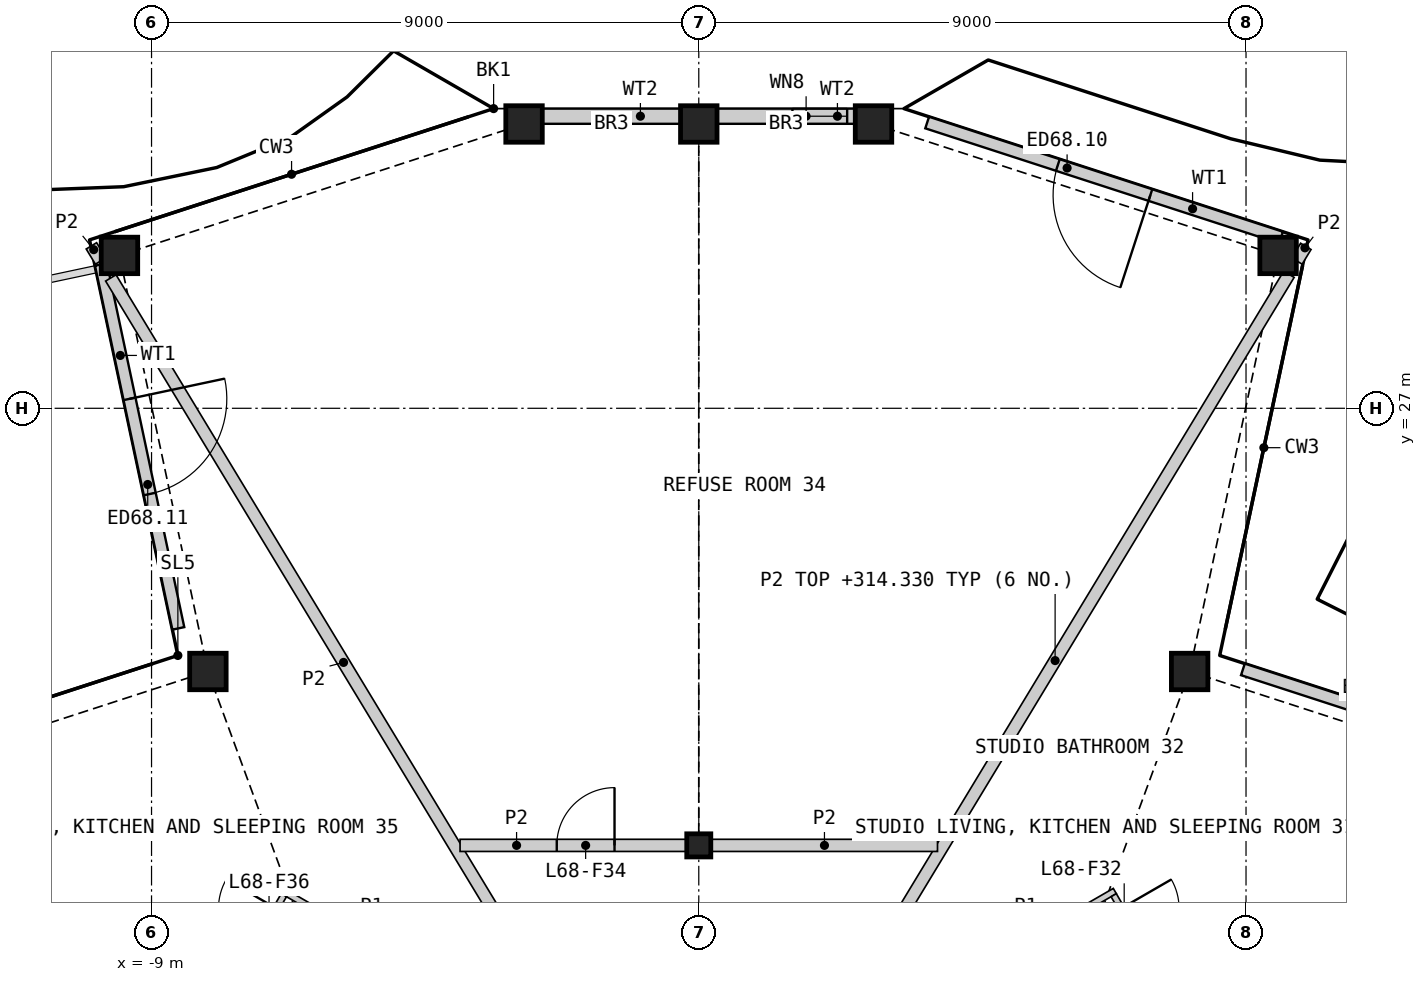
"""IFC4 building model, lengths in metres.
Left out: names, types, materials, properties, quantities, classifications, styles, units other than length and angle.
Written with IfcOpenShell. Run it as: python <this file> out.ifc"""

import sys

from ifc_helpers import new_model, si_unit, direction, frame, frame_2d, origin, origin_2d, place, context, subcontext, project, spatial, rectangle, hollow_rectangle, i_section, extrude, element, fill, save


model = new_model("IFC4")
c1 = context("Model", 3, precision=1e-05, world=origin(), true_north=direction((0.0, 1.0)))
c2 = subcontext(c1, "Body", "Model", "MODEL_VIEW")
j1 = project(units=[si_unit("LENGTHUNIT", "METRE"), si_unit("PLANEANGLEUNIT", "RADIAN")], contexts=[c1])
p1 = place(None, origin())
s1 = spatial("IfcSite", under=j1, at=p1, CompositionType="ELEMENT")
p2 = place(p1, origin())
s2 = spatial("IfcBuilding", under=s1, at=p2, CompositionType="ELEMENT")
p3 = place(p2, frame((0.0, 0.0, 312.0)))
s3 = spatial("IfcBuildingStorey", under=s2, at=p3, CompositionType="ELEMENT", Elevation=312.0)
for number, where, z_axis, x_axis in (
    (1, (8.073, 22.671, 0.0), (0.0, 0.0, 1.0), (1.0, 0.0, 0.0)),
    (2, (9.527, 29.514, 0.0), (0.0, 0.0, 1.0), (1.0, 0.0, 0.0)),
    (3, (2.874, 31.676, 0.0), (0.0, 0.0, 1.0), (1.0, 0.0, 0.0)),
    (4, (0.0, 31.676, 0.0), (0.0, 0.0, 1.0), (1.0, 0.0, 0.0)),
    (5, (-2.874, 31.676, 0.0), (0.0, 0.0, 1.0), (1.0, 0.0, 0.0)),
    (6, (-9.527, 29.514, 0.0), (0.0, 0.0, 1.0), (1.0, 0.0, 0.0)),
    (7, (-8.073, 22.671, 0.0), (0.0, 0.0, 1.0), (1.0, 0.0, 0.0)),
):
    element("IfcColumn", number, at=place(p3, frame(where, z_axis=z_axis, x_axis=x_axis)), inside=s3, PredefinedType="COLUMN", context=c2, shape_type="SweptSolid", body=[
        extrude(hollow_rectangle(XDim=0.6, YDim=0.6, WallThickness=0.04, at=origin_2d()), origin(), (0.0, 0.0, 1.0), 3.4),
    ])
p4 = place(p3, frame((0.0, 19.811, 0.0), z_axis=(0.0, 0.0, 1.0), x_axis=(1.0, 0.0, 0.0)))
e8 = element("IfcColumn", 8, at=p4, inside=s3, PredefinedType="COLUMN", context=c2, shape_type="SweptSolid", body=[
    extrude(i_section(OverallWidth=0.396, OverallDepth=0.381, WebThickness=0.019, FlangeThickness=0.03, at=origin_2d()), origin(), (0.0, 0.0, 1.0), 3.4),
])
p5 = place(p3, frame((14.769, 20.814, 0.0), z_axis=(0.0, 0.0, 1.0), x_axis=(-0.951069243123, 0.308977822483, 0.0)))
e9 = element("IfcWall", 9, at=p5, inside=s3, PredefinedType="SOLIDWALL", context=c2, shape_type="SweptSolid", body=[
    extrude(rectangle(XDim=6.12, YDim=0.2, at=frame_2d((3.06, 0.0))), origin(), (0.0, 0.0, 1.0), 2.488),
])
p6 = place(p5, frame((2.26, 0.0, 0.0)))
e10 = element("IfcOpeningElement", 10, at=p6, cuts=e9, PredefinedType="OPENING", context=c2, shape_type="SweptSolid", body=[
    extrude(rectangle(XDim=1.6, YDim=2.25, at=frame_2d((0.8, 1.125))), frame((0.0, 0.11, 0.0), z_axis=(0.0, -1.0, 0.0), x_axis=(1.0, 0.0, 0.0)), (0.0, 0.0, 1.0), 0.22),
])
p7 = place(p3, frame((9.576, 29.809, 0.0), z_axis=(0.0, 0.0, 1.0), x_axis=(-0.951053709789, 0.309025631781, 0.0)))
e11 = element("IfcWall", 11, at=p7, inside=s3, PredefinedType="SOLIDWALL", context=c2, shape_type="SweptSolid", body=[
    extrude(rectangle(XDim=6.12, YDim=0.2, at=frame_2d((3.06, 0.0))), origin(), (0.0, 0.0, 1.0), 2.488),
])
p8 = place(p7, frame((2.26, 0.0, 0.0)))
e12 = element("IfcOpeningElement", 12, at=p8, cuts=e11, PredefinedType="OPENING", context=c2, shape_type="SweptSolid", body=[
    extrude(rectangle(XDim=1.6, YDim=2.25, at=frame_2d((0.8, 1.125))), frame((0.0, 0.11, 0.0), z_axis=(0.0, -1.0, 0.0), x_axis=(1.0, 0.0, 0.0)), (0.0, 0.0, 1.0), 0.22),
])
p9 = place(p3, frame((2.94, 31.804, 0.0), z_axis=(0.0, 0.0, 1.0), x_axis=(-1.0, 0.0, 0.0)))
e13 = element("IfcWall", 13, at=p9, inside=s3, PredefinedType="SOLIDWALL", context=c2, shape_type="SweptSolid", body=[
    extrude(rectangle(XDim=2.64, YDim=0.25, at=frame_2d((1.32, 0.0))), origin(), (0.0, 0.0, 1.0), 2.488),
])
p10 = place(p9, frame((0.5, 0.0, 1.5)))
e14 = element("IfcOpeningElement", 14, at=p10, cuts=e13, PredefinedType="OPENING", context=c2, shape_type="SweptSolid", body=[
    extrude(rectangle(XDim=0.9, YDim=0.7, at=frame_2d((0.45, 0.35))), frame((0.0, 0.135, 0.0), z_axis=(0.0, -1.0, 0.0), x_axis=(1.0, 0.0, 0.0)), (0.0, 0.0, 1.0), 0.27),
])
p11 = place(p3, frame((-0.3, 31.804, 0.0), z_axis=(0.0, 0.0, 1.0), x_axis=(-1.0, 0.0, 0.0)))
e15 = element("IfcWall", 15, at=p11, inside=s3, PredefinedType="SOLIDWALL", context=c2, shape_type="SweptSolid", body=[
    extrude(rectangle(XDim=2.64, YDim=0.25, at=frame_2d((1.32, 0.0))), origin(), (0.0, 0.0, 1.0), 2.488),
])
p12 = place(p3, frame((-9.832, 29.366, 0.0), z_axis=(0.0, 0.0, 1.0), x_axis=(0.207932234858, -0.978143233738, 0.0)))
e16 = element("IfcWall", 16, at=p12, inside=s3, PredefinedType="SOLIDWALL", context=c2, shape_type="SweptSolid", body=[
    extrude(rectangle(XDim=6.12, YDim=0.2, at=frame_2d((3.06, 0.0))), origin(), (0.0, 0.0, 1.0), 2.488),
])
p13 = place(p12, frame((2.26, 0.0, 0.0)))
e17 = element("IfcOpeningElement", 17, at=p13, cuts=e16, PredefinedType="OPENING", context=c2, shape_type="SweptSolid", body=[
    extrude(rectangle(XDim=1.6, YDim=2.25, at=frame_2d((0.8, 1.125))), frame((0.0, 0.11, 0.0), z_axis=(0.0, -1.0, 0.0), x_axis=(1.0, 0.0, 0.0)), (0.0, 0.0, 1.0), 0.22),
])
p14 = place(p3, frame((3.472, 13.997, 0.0), z_axis=(0.0, 0.0, 1.0), x_axis=(0.866029233976, 0.499993365855, 0.0)))
e18 = element("IfcWall", 18, at=p14, inside=s3, PredefinedType="PARTITIONING", context=c2, shape_type="SweptSolid", body=[
    extrude(rectangle(XDim=12.637, YDim=0.25, at=frame_2d((6.319, 0.0))), origin(), (0.0, 0.0, 1.0), 2.33),
])
p15 = place(p3, frame((-14.417, 20.316, 0.0), z_axis=(0.0, 0.0, 1.0), x_axis=(0.866022207469, -0.50000553614, 0.0)))
e19 = element("IfcWall", 19, at=p15, inside=s3, PredefinedType="PARTITIONING", context=c2, shape_type="SweptSolid", body=[
    extrude(rectangle(XDim=7.042, YDim=0.25, at=frame_2d((3.521, 0.0))), origin(), (0.0, 0.0, 1.0), 2.33),
])
p16 = place(p3, frame((2.015, 16.497, 0.0), z_axis=(0.0, 0.0, 1.0), x_axis=(0.517779253395, 0.855514257482, 0.0)))
e20 = element("IfcWall", 20, at=p16, inside=s3, PredefinedType="PARTITIONING", context=c2, shape_type="SweptSolid", body=[
    extrude(rectangle(XDim=14.854, YDim=0.2, at=frame_2d((7.427, 0.0))), origin(), (0.0, 0.0, 1.0), 2.33),
])
p17 = place(p3, frame((-9.669, 29.144, 0.0), z_axis=(0.0, 0.0, 1.0), x_axis=(0.517770554559, -0.85551952218, 0.0)))
e21 = element("IfcWall", 21, at=p17, inside=s3, PredefinedType="PARTITIONING", context=c2, shape_type="SweptSolid", body=[
    extrude(rectangle(XDim=14.784, YDim=0.2, at=frame_2d((7.392, 0.0))), origin(), (0.0, 0.0, 1.0), 2.33),
])
p18 = place(p3, frame((-3.926, 19.811, 0.0), z_axis=(0.0, 0.0, 1.0), x_axis=(1.0, 0.0, 0.0)))
e22 = element("IfcWall", 22, at=p18, inside=s3, PredefinedType="PARTITIONING", context=c2, shape_type="SweptSolid", body=[
    extrude(rectangle(XDim=3.718, YDim=0.2, at=frame_2d((1.859, 0.0))), origin(), (0.0, 0.0, 1.0), 2.33),
])
p19 = place(p18, frame((1.59, 0.0, 0.0)))
e23 = element("IfcOpeningElement", 23, at=p19, cuts=e22, PredefinedType="OPENING", context=c2, shape_type="SweptSolid", body=[
    extrude(rectangle(XDim=0.95, YDim=2.1, at=frame_2d((0.475, 1.05))), frame((0.0, 0.11, 0.0), z_axis=(0.0, -1.0, 0.0), x_axis=(1.0, 0.0, 0.0)), (0.0, 0.0, 1.0), 0.22),
])
p20 = place(p3, frame((0.208, 19.811, 0.0), z_axis=(0.0, 0.0, 1.0), x_axis=(1.0, 0.0, 0.0)))
e24 = element("IfcWall", 24, at=p20, inside=s3, PredefinedType="PARTITIONING", context=c2, shape_type="SweptSolid", body=[
    extrude(rectangle(XDim=3.718, YDim=0.2, at=frame_2d((1.859, 0.0))), origin(), (0.0, 0.0, 1.0), 2.33),
])
p21 = place(p3, frame((-9.989, 29.672, 0.0), z_axis=(0.0, 0.0, 1.0), x_axis=(0.517931387916, -0.855422163268, 0.0)))
e25 = element("IfcWall", 25, at=p21, inside=s3, PredefinedType="PARTITIONING", context=c2, shape_type="SweptSolid", body=[
    extrude(rectangle(XDim=0.292, YDim=0.2, at=frame_2d((0.146, 0.0))), origin(), (0.0, 0.0, 1.0), 2.33),
])
p22 = place(p3, frame((9.837, 29.422, 0.0), z_axis=(0.0, 0.0, 1.0), x_axis=(0.517419338909, 0.855731983581, 0.0)))
e26 = element("IfcWall", 26, at=p22, inside=s3, PredefinedType="PARTITIONING", context=c2, shape_type="SweptSolid", body=[
    extrude(rectangle(XDim=0.282, YDim=0.2, at=frame_2d((0.141, 0.0))), origin(), (0.0, 0.0, 1.0), 2.33),
])
for number, where, z_axis, x_axis in (
    (27, (4.417, 17.66, 0.0), (0.0, 0.0, 1.0), (0.866, 0.5, 0.0)),
    (28, (-6.842, 19.06, 0.0), (0.0, 0.0, 1.0), (0.866, -0.5, 0.0)),
):
    element("IfcWall", number, at=place(p3, frame(where, z_axis=z_axis, x_axis=x_axis)), inside=s3, PredefinedType="PARTITIONING", context=c2, shape_type="SweptSolid", body=[
        extrude(rectangle(XDim=2.8, YDim=0.1, at=frame_2d((1.4, 0.0))), origin(), (0.0, 0.0, 1.0), 2.33),
    ])
p23 = place(p3, frame((6.824, 18.992, 0.0), z_axis=(0.0, 0.0, 1.0), x_axis=(0.50001820224, -0.866014894461, 0.0)))
e29 = element("IfcWall", 29, at=p23, inside=s3, PredefinedType="PARTITIONING", context=c2, shape_type="SweptSolid", body=[
    extrude(rectangle(XDim=2.525, YDim=0.1, at=frame_2d((1.262, 0.0))), origin(), (0.0, 0.0, 1.0), 2.33),
])
p24 = place(p23, frame((0.25, 0.0, 0.0)))
e30 = element("IfcOpeningElement", 30, at=p24, cuts=e29, PredefinedType="OPENING", context=c2, shape_type="SweptSolid", body=[
    extrude(rectangle(XDim=0.95, YDim=2.1, at=frame_2d((0.475, 1.05))), frame((0.0, 0.06, 0.0), z_axis=(0.0, -1.0, 0.0), x_axis=(1.0, 0.0, 0.0)), (0.0, 0.0, 1.0), 0.12),
])
p25 = place(p3, frame((-8.086, 16.805, 0.0), z_axis=(0.0, 0.0, 1.0), x_axis=(0.50001820224, 0.866014894461, 0.0)))
e31 = element("IfcWall", 31, at=p25, inside=s3, PredefinedType="PARTITIONING", context=c2, shape_type="SweptSolid", body=[
    extrude(rectangle(XDim=2.525, YDim=0.1, at=frame_2d((1.262, 0.0))), origin(), (0.0, 0.0, 1.0), 2.33),
])
p26 = place(p25, frame((1.325, 0.0, 0.0)))
e32 = element("IfcOpeningElement", 32, at=p26, cuts=e31, PredefinedType="OPENING", context=c2, shape_type="SweptSolid", body=[
    extrude(rectangle(XDim=0.95, YDim=2.1, at=frame_2d((0.475, 1.05))), frame((0.0, 0.06, 0.0), z_axis=(0.0, -1.0, 0.0), x_axis=(1.0, 0.0, 0.0)), (0.0, 0.0, 1.0), 0.12),
])
p27 = place(p8, origin())
e33 = element("IfcDoor", 33, at=p27, inside=s3, OperationType="DOUBLE_DOOR_SINGLE_SWING", PredefinedType="DOOR", context=c2, shape_type="SweptSolid", body=[
    extrude(rectangle(XDim=1.6, YDim=2.25, at=frame_2d((0.8, 1.125))), frame((0.0, 0.025, 0.0), z_axis=(0.0, -1.0, 0.0), x_axis=(1.0, 0.0, 0.0)), (0.0, 0.0, 1.0), 0.05),
])
fill(e12, e33)
p28 = place(p10, origin())
e34 = element("IfcWindow", 34, at=p28, inside=s3, PartitioningType="SINGLE_PANEL", PredefinedType="WINDOW", context=c2, shape_type="SweptSolid", body=[
    extrude(rectangle(XDim=0.9, YDim=0.7, at=frame_2d((0.45, 0.35))), frame((0.0, 0.03, 0.0), z_axis=(0.0, -1.0, 0.0), x_axis=(1.0, 0.0, 0.0)), (0.0, 0.0, 1.0), 0.06),
])
fill(e14, e34)
p29 = place(p13, origin())
e35 = element("IfcDoor", 35, at=p29, inside=s3, OperationType="DOUBLE_DOOR_SINGLE_SWING", PredefinedType="DOOR", context=c2, shape_type="SweptSolid", body=[
    extrude(rectangle(XDim=1.6, YDim=2.25, at=frame_2d((0.8, 1.125))), frame((0.0, 0.025, 0.0), z_axis=(0.0, -1.0, 0.0), x_axis=(1.0, 0.0, 0.0)), (0.0, 0.0, 1.0), 0.05),
])
fill(e17, e35)
p30 = place(p19, origin())
e36 = element("IfcDoor", 36, at=p30, inside=s3, OperationType="SINGLE_SWING_RIGHT", PredefinedType="DOOR", context=c2, shape_type="SweptSolid", body=[
    extrude(rectangle(XDim=0.95, YDim=2.1, at=frame_2d((0.475, 1.05))), frame((0.0, 0.025, 0.0), z_axis=(0.0, -1.0, 0.0), x_axis=(1.0, 0.0, 0.0)), (0.0, 0.0, 1.0), 0.05),
])
fill(e23, e36)
save(model, sys.argv[1])
